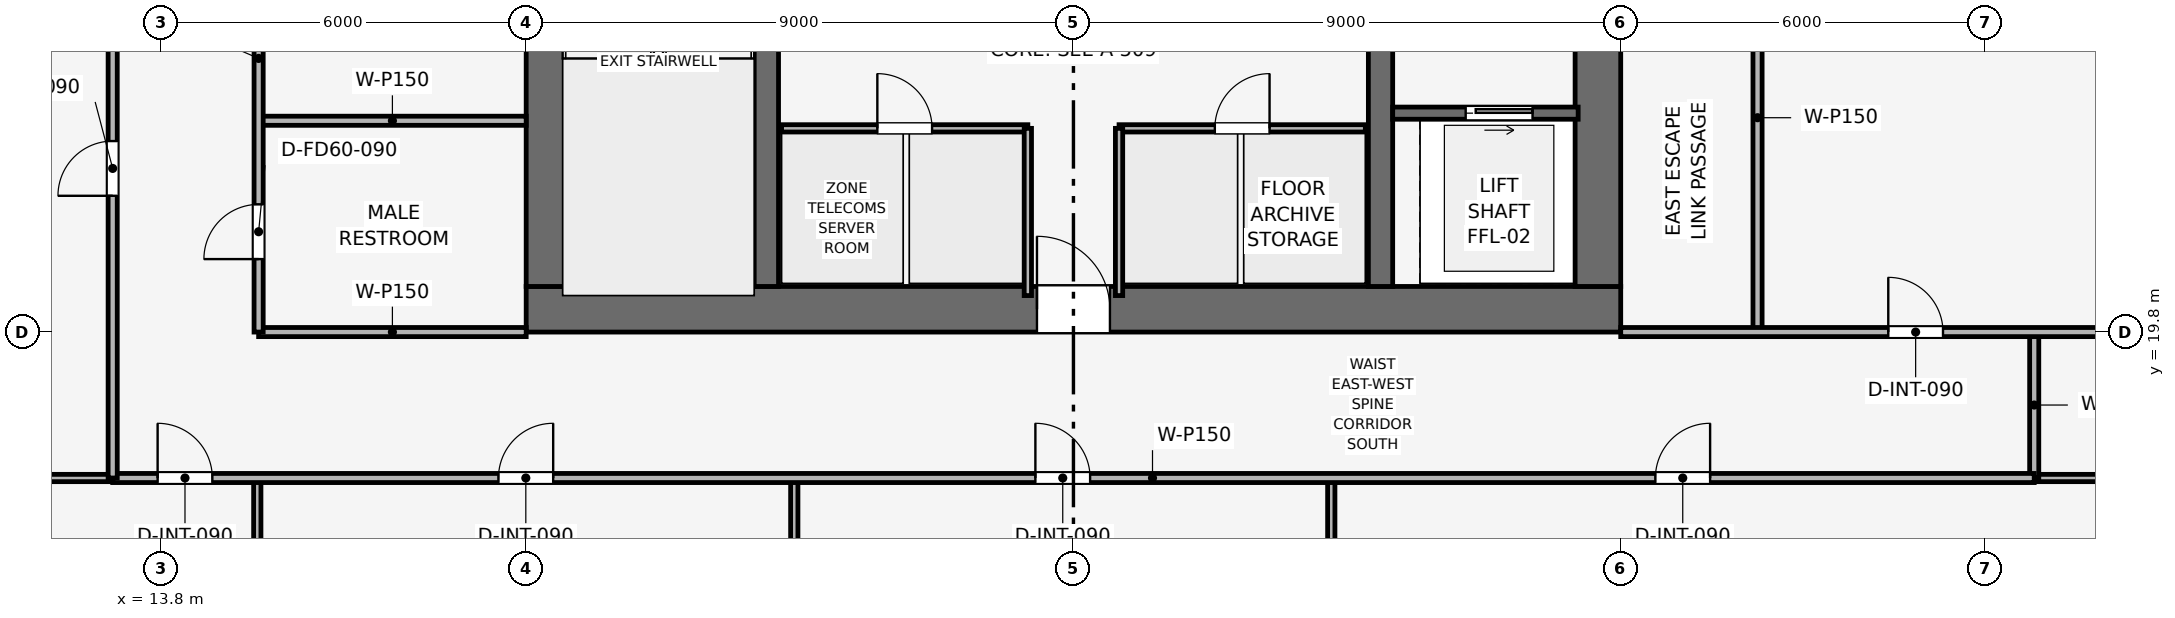
"""IFC4 building model, lengths in metres.
Left out: names, types, materials, properties, quantities, classifications, styles, units other than length and angle.
Written with IfcOpenShell. Run it as: python <this file> out.ifc"""

import sys

from ifc_helpers import new_model, si_unit, direction, frame, frame_2d, origin, place, context, subcontext, project, spatial, rectangle, extrude, element, fill, save


model = new_model("IFC4")
c1 = context("Model", 3, precision=1e-05, world=origin(), true_north=direction((0.0, 1.0)))
c2 = subcontext(c1, "Body", "Model", "MODEL_VIEW")
j1 = project(units=[si_unit("LENGTHUNIT", "METRE"), si_unit("PLANEANGLEUNIT", "RADIAN")], contexts=[c1])
p1 = place(None, origin())
s1 = spatial("IfcSite", under=j1, at=p1, CompositionType="ELEMENT")
p2 = place(p1, origin())
s2 = spatial("IfcBuilding", under=s1, at=p2, CompositionType="ELEMENT")
p3 = place(p2, frame((0.0, 0.0, 203.7)))
s3 = spatial("IfcBuildingStorey", under=s2, at=p3, CompositionType="ELEMENT", Elevation=203.7)
p4 = place(p3, frame((19.8, 20.175, 0.0), z_axis=(0.0, 0.0, 1.0), x_axis=(1.0, 0.0, 0.0)))
e1 = element("IfcWall", 1, at=p4, inside=s3, PredefinedType="SHEAR", context=c2, shape_type="SweptSolid", body=[
    extrude(rectangle(XDim=18.0, YDim=0.75, at=frame_2d((9.0, 0.0))), origin(), (0.0, 0.0, 1.0), 3.75),
])
p5 = place(p4, frame((8.4, 0.0, 0.0)))
e2 = element("IfcOpeningElement", 2, at=p5, cuts=e1, PredefinedType="OPENING", context=c2, shape_type="SweptSolid", body=[
    extrude(rectangle(XDim=1.2, YDim=2.2, at=frame_2d((0.6, 1.1))), frame((0.0, 0.385, 0.0), z_axis=(0.0, -1.0, 0.0), x_axis=(1.0, 0.0, 0.0)), (0.0, 0.0, 1.0), 0.77),
])
p6 = place(p3, frame((20.175, 20.55, 0.0), z_axis=(0.0, 0.0, 1.0), x_axis=(0.0, 1.0, 0.0)))
e3 = element("IfcWall", 3, at=p6, inside=s3, PredefinedType="SHEAR", context=c2, shape_type="SweptSolid", body=[
    extrude(rectangle(XDim=16.5, YDim=0.75, at=frame_2d((8.25, 0.0))), origin(), (0.0, 0.0, 1.0), 3.75),
])
p7 = place(p6, frame((10.25, 0.0, 0.0)))
e4 = element("IfcOpeningElement", 4, at=p7, cuts=e3, PredefinedType="OPENING", context=c2, shape_type="SweptSolid", body=[
    extrude(rectangle(XDim=1.1, YDim=2.15, at=frame_2d((0.55, 1.075))), frame((0.0, 0.385, 0.0), z_axis=(0.0, -1.0, 0.0), x_axis=(1.0, 0.0, 0.0)), (0.0, 0.0, 1.0), 0.77),
])
p8 = place(p3, frame((37.425, 20.55, 0.0), z_axis=(0.0, 0.0, 1.0), x_axis=(0.0, 1.0, 0.0)))
e5 = element("IfcWall", 5, at=p8, inside=s3, PredefinedType="SHEAR", context=c2, shape_type="SweptSolid", body=[
    extrude(rectangle(XDim=16.5, YDim=0.75, at=frame_2d((8.25, 0.0))), origin(), (0.0, 0.0, 1.0), 3.75),
])
p9 = place(p8, frame((4.75, 0.0, 0.0)))
e6 = element("IfcOpeningElement", 6, at=p9, cuts=e5, PredefinedType="OPENING", context=c2, shape_type="SweptSolid", body=[
    extrude(rectangle(XDim=1.1, YDim=2.15, at=frame_2d((0.55, 1.075))), frame((0.0, 0.385, 0.0), z_axis=(0.0, -1.0, 0.0), x_axis=(1.0, 0.0, 0.0)), (0.0, 0.0, 1.0), 0.77),
])
for number, where, z_axis, x_axis in (
    (7, (23.75, 20.55, 0.0), (0.0, 0.0, 1.0), (0.0, 1.0, 0.0)),
    (8, (33.85, 20.55, 0.0), (0.0, 0.0, 1.0), (0.0, 1.0, 0.0)),
):
    element("IfcWall", number, at=place(p3, frame(where, z_axis=z_axis, x_axis=x_axis)), inside=s3, PredefinedType="SHEAR", context=c2, shape_type="SweptSolid", body=[
        extrude(rectangle(XDim=16.5, YDim=0.4, at=frame_2d((8.25, 0.0))), origin(), (0.0, 0.0, 1.0), 3.75),
    ])
p10 = place(p3, frame((34.05, 23.4, 0.0), z_axis=(0.0, 0.0, 1.0), x_axis=(1.0, 0.0, 0.0)))
e9 = element("IfcWall", 9, at=p10, inside=s3, PredefinedType="SHEAR", context=c2, shape_type="SweptSolid", body=[
    extrude(rectangle(XDim=3.05, YDim=0.2, at=frame_2d((1.525, 0.0))), origin(), (0.0, 0.0, 1.0), 3.5),
])
p11 = place(p10, frame((1.2, 0.0, 0.0)))
e10 = element("IfcOpeningElement", 10, at=p11, cuts=e9, PredefinedType="OPENING", context=c2, shape_type="SweptSolid", body=[
    extrude(rectangle(XDim=1.1, YDim=2.15, at=frame_2d((0.55, 1.075))), frame((0.0, 0.11, 0.0), z_axis=(0.0, -1.0, 0.0), x_axis=(1.0, 0.0, 0.0)), (0.0, 0.0, 1.0), 0.22),
])
p12 = place(p3, frame((24.0, 23.15, 0.0), z_axis=(0.0, 0.0, 1.0), x_axis=(1.0, 0.0, 0.0)))
e11 = element("IfcWall", 11, at=p12, inside=s3, PredefinedType="PARTITIONING", context=c2, shape_type="SweptSolid", body=[
    extrude(rectangle(XDim=4.05, YDim=0.12, at=frame_2d((2.025, 0.0))), origin(), (0.0, 0.0, 1.0), 3.5),
])
p13 = place(p12, frame((1.575, 0.0, 0.0)))
e12 = element("IfcOpeningElement", 12, at=p13, cuts=e11, PredefinedType="OPENING", context=c2, shape_type="SweptSolid", body=[
    extrude(rectangle(XDim=0.9, YDim=2.1, at=frame_2d((0.45, 1.05))), frame((0.0, 0.07, 0.0), z_axis=(0.0, -1.0, 0.0), x_axis=(1.0, 0.0, 0.0)), (0.0, 0.0, 1.0), 0.14),
])
p14 = place(p3, frame((28.05, 20.4, 0.0), z_axis=(0.0, 0.0, 1.0), x_axis=(0.0, 1.0, 0.0)))
e13 = element("IfcWall", 13, at=p14, inside=s3, PredefinedType="PARTITIONING", context=c2, shape_type="SweptSolid", body=[
    extrude(rectangle(XDim=2.75, YDim=0.12, at=frame_2d((1.375, 0.0))), origin(), (0.0, 0.0, 1.0), 3.5),
])
p15 = place(p3, frame((29.55, 23.15, 0.0), z_axis=(0.0, 0.0, 1.0), x_axis=(1.0, 0.0, 0.0)))
e14 = element("IfcWall", 14, at=p15, inside=s3, PredefinedType="PARTITIONING", context=c2, shape_type="SweptSolid", body=[
    extrude(rectangle(XDim=4.05, YDim=0.12, at=frame_2d((2.025, 0.0))), origin(), (0.0, 0.0, 1.0), 3.5),
])
p16 = place(p15, frame((1.575, 0.0, 0.0)))
e15 = element("IfcOpeningElement", 15, at=p16, cuts=e14, PredefinedType="OPENING", context=c2, shape_type="SweptSolid", body=[
    extrude(rectangle(XDim=0.9, YDim=2.1, at=frame_2d((0.45, 1.05))), frame((0.0, 0.07, 0.0), z_axis=(0.0, -1.0, 0.0), x_axis=(1.0, 0.0, 0.0)), (0.0, 0.0, 1.0), 0.14),
])
p17 = place(p3, frame((29.55, 20.4, 0.0), z_axis=(0.0, 0.0, 1.0), x_axis=(0.0, 1.0, 0.0)))
e16 = element("IfcWall", 16, at=p17, inside=s3, PredefinedType="PARTITIONING", context=c2, shape_type="SweptSolid", body=[
    extrude(rectangle(XDim=2.75, YDim=0.12, at=frame_2d((1.375, 0.0))), origin(), (0.0, 0.0, 1.0), 3.5),
])
p18 = place(p3, frame((15.4, 19.8, 0.0), z_axis=(0.0, 0.0, 1.0), x_axis=(1.0, 0.0, 0.0)))
e17 = element("IfcWall", 17, at=p18, inside=s3, PredefinedType="PARTITIONING", context=c2, shape_type="SweptSolid", body=[
    extrude(rectangle(XDim=4.4, YDim=0.15, at=frame_2d((2.2, 0.0))), origin(), (0.0, 0.0, 1.0), 3.035),
])
p19 = place(p3, frame((15.4, 23.275, 0.0), z_axis=(0.0, 0.0, 1.0), x_axis=(1.0, 0.0, 0.0)))
e18 = element("IfcWall", 18, at=p19, inside=s3, PredefinedType="PARTITIONING", context=c2, shape_type="SweptSolid", body=[
    extrude(rectangle(XDim=4.4, YDim=0.15, at=frame_2d((2.2, 0.0))), origin(), (0.0, 0.0, 1.0), 3.5),
])
p20 = place(p3, frame((15.4, 19.8, 0.0), z_axis=(0.0, 0.0, 1.0), x_axis=(0.0, 1.0, 0.0)))
e19 = element("IfcWall", 19, at=p20, inside=s3, PredefinedType="PARTITIONING", context=c2, shape_type="SweptSolid", body=[
    extrude(rectangle(XDim=10.35, YDim=0.15, at=frame_2d((5.175, 0.0))), origin(), (0.0, 0.0, 1.0), 3.035),
])
p21 = place(p20, frame((1.2, 0.0, 0.0)))
e20 = element("IfcOpeningElement", 20, at=p21, cuts=e19, PredefinedType="OPENING", context=c2, shape_type="SweptSolid", body=[
    extrude(rectangle(XDim=0.9, YDim=2.1, at=frame_2d((0.45, 1.05))), frame((0.0, 0.085, 0.0), z_axis=(0.0, -1.0, 0.0), x_axis=(1.0, 0.0, 0.0)), (0.0, 0.0, 1.0), 0.17),
])
p22 = place(p20, frame((4.7, 0.0, 0.0)))
e21 = element("IfcOpeningElement", 21, at=p22, cuts=e19, PredefinedType="OPENING", context=c2, shape_type="SweptSolid", body=[
    extrude(rectangle(XDim=0.9, YDim=2.1, at=frame_2d((0.45, 1.05))), frame((0.0, 0.085, 0.0), z_axis=(0.0, -1.0, 0.0), x_axis=(1.0, 0.0, 0.0)), (0.0, 0.0, 1.0), 0.17),
])
p23 = place(p20, frame((8.1, 0.0, 0.0)))
e22 = element("IfcOpeningElement", 22, at=p23, cuts=e19, PredefinedType="OPENING", context=c2, shape_type="SweptSolid", body=[
    extrude(rectangle(XDim=0.95, YDim=2.1, at=frame_2d((0.475, 1.05))), frame((0.0, 0.085, 0.0), z_axis=(0.0, -1.0, 0.0), x_axis=(1.0, 0.0, 0.0)), (0.0, 0.0, 1.0), 0.17),
])
p24 = place(p3, frame((40.05, 19.8, 0.0), z_axis=(0.0, 0.0, 1.0), x_axis=(0.0, 1.0, 0.0)))
e23 = element("IfcWall", 23, at=p24, inside=s3, PredefinedType="PARTITIONING", context=c2, shape_type="SweptSolid", body=[
    extrude(rectangle(XDim=7.05, YDim=0.15, at=frame_2d((3.525, 0.0))), origin(), (0.0, 0.0, 1.0), 3.035),
])
for number, where, z_axis, x_axis in (
    (24, (15.378, 1.93, 0.0), (0.0, 0.0, 1.0), (0.0, 1.0, 0.0)),
    (25, (24.209, 1.93, 0.0), (0.0, 0.0, 1.0), (0.0, 1.0, 0.0)),
    (26, (33.04, 1.93, 0.0), (0.0, 0.0, 1.0), (0.0, 1.0, 0.0)),
):
    element("IfcWall", number, at=place(p3, frame(where, z_axis=z_axis, x_axis=x_axis)), inside=s3, PredefinedType="PARTITIONING", context=c2, shape_type="SweptSolid", body=[
        extrude(rectangle(XDim=15.47, YDim=0.12, at=frame_2d((7.735, 0.0))), origin(), (0.0, 0.0, 1.0), 2.885),
    ])
p25 = place(p3, frame((1.93, 17.4, 0.0), z_axis=(0.0, 0.0, 1.0), x_axis=(1.0, 0.0, 0.0)))
e27 = element("IfcWall", 27, at=p25, inside=s3, PredefinedType="PARTITIONING", context=c2, shape_type="SweptSolid", body=[
    extrude(rectangle(XDim=11.07, YDim=0.12, at=frame_2d((5.535, 0.0))), origin(), (0.0, 0.0, 1.0), 2.885),
])
p26 = place(p3, frame((44.6, 17.4, 0.0), z_axis=(0.0, 0.0, 1.0), x_axis=(1.0, 0.0, 0.0)))
e28 = element("IfcWall", 28, at=p26, inside=s3, PredefinedType="PARTITIONING", context=c2, shape_type="SweptSolid", body=[
    extrude(rectangle(XDim=11.07, YDim=0.12, at=frame_2d((5.535, 0.0))), origin(), (0.0, 0.0, 1.0), 2.885),
])
p27 = place(p3, frame((44.6, 17.4, 0.0), z_axis=(0.0, 0.0, 1.0), x_axis=(0.0, 1.0, 0.0)))
e29 = element("IfcWall", 29, at=p27, inside=s3, PredefinedType="PARTITIONING", context=c2, shape_type="SweptSolid", body=[
    extrude(rectangle(XDim=2.4, YDim=0.15, at=frame_2d((1.2, 0.0))), origin(), (0.0, 0.0, 1.0), 3.5),
])
p28 = place(p3, frame((37.8, 19.8, 0.0), z_axis=(0.0, 0.0, 1.0), x_axis=(1.0, 0.0, 0.0)))
e30 = element("IfcWall", 30, at=p28, inside=s3, PredefinedType="PARTITIONING", context=c2, shape_type="SweptSolid", body=[
    extrude(rectangle(XDim=17.87, YDim=0.15, at=frame_2d((8.935, 0.0))), origin(), (0.0, 0.0, 1.0), 2.885),
])
p29 = place(p28, frame((4.4, 0.0, 0.0)))
e31 = element("IfcOpeningElement", 31, at=p29, cuts=e30, PredefinedType="OPENING", context=c2, shape_type="SweptSolid", body=[
    extrude(rectangle(XDim=0.9, YDim=2.1, at=frame_2d((0.45, 1.05))), frame((0.0, 0.085, 0.0), z_axis=(0.0, -1.0, 0.0), x_axis=(1.0, 0.0, 0.0)), (0.0, 0.0, 1.0), 0.17),
])
p30 = place(p3, frame((13.0, 17.4, 0.0), z_axis=(0.0, 0.0, 1.0), x_axis=(1.0, 0.0, 0.0)))
e32 = element("IfcWall", 32, at=p30, inside=s3, PredefinedType="PARTITIONING", context=c2, shape_type="SweptSolid", body=[
    extrude(rectangle(XDim=31.6, YDim=0.15, at=frame_2d((15.8, 0.0))), origin(), (0.0, 0.0, 1.0), 3.035),
])
p31 = place(p30, frame((0.739, 0.0, 0.0)))
e33 = element("IfcOpeningElement", 33, at=p31, cuts=e32, PredefinedType="OPENING", context=c2, shape_type="SweptSolid", body=[
    extrude(rectangle(XDim=0.9, YDim=2.1, at=frame_2d((0.45, 1.05))), frame((0.0, 0.085, 0.0), z_axis=(0.0, -1.0, 0.0), x_axis=(1.0, 0.0, 0.0)), (0.0, 0.0, 1.0), 0.17),
])
p32 = place(p30, frame((6.344, 0.0, 0.0)))
e34 = element("IfcOpeningElement", 34, at=p32, cuts=e32, PredefinedType="OPENING", context=c2, shape_type="SweptSolid", body=[
    extrude(rectangle(XDim=0.9, YDim=2.1, at=frame_2d((0.45, 1.05))), frame((0.0, 0.085, 0.0), z_axis=(0.0, -1.0, 0.0), x_axis=(1.0, 0.0, 0.0)), (0.0, 0.0, 1.0), 0.17),
])
p33 = place(p30, frame((15.174, 0.0, 0.0)))
e35 = element("IfcOpeningElement", 35, at=p33, cuts=e32, PredefinedType="OPENING", context=c2, shape_type="SweptSolid", body=[
    extrude(rectangle(XDim=0.9, YDim=2.1, at=frame_2d((0.45, 1.05))), frame((0.0, 0.085, 0.0), z_axis=(0.0, -1.0, 0.0), x_axis=(1.0, 0.0, 0.0)), (0.0, 0.0, 1.0), 0.17),
])
p34 = place(p30, frame((25.37, 0.0, 0.0)))
e36 = element("IfcOpeningElement", 36, at=p34, cuts=e32, PredefinedType="OPENING", context=c2, shape_type="SweptSolid", body=[
    extrude(rectangle(XDim=0.9, YDim=2.1, at=frame_2d((0.45, 1.05))), frame((0.0, 0.085, 0.0), z_axis=(0.0, -1.0, 0.0), x_axis=(1.0, 0.0, 0.0)), (0.0, 0.0, 1.0), 0.17),
])
p35 = place(p3, frame((13.0, 17.4, 0.0), z_axis=(0.0, 0.0, 1.0), x_axis=(0.0, 1.0, 0.0)))
e37 = element("IfcWall", 37, at=p35, inside=s3, PredefinedType="PARTITIONING", context=c2, shape_type="SweptSolid", body=[
    extrude(rectangle(XDim=22.8, YDim=0.15, at=frame_2d((11.4, 0.0))), origin(), (0.0, 0.0, 1.0), 3.035),
])
p36 = place(p35, frame((4.641, 0.0, 0.0)))
e38 = element("IfcOpeningElement", 38, at=p36, cuts=e37, PredefinedType="OPENING", context=c2, shape_type="SweptSolid", body=[
    extrude(rectangle(XDim=0.9, YDim=2.1, at=frame_2d((0.45, 1.05))), frame((0.0, 0.085, 0.0), z_axis=(0.0, -1.0, 0.0), x_axis=(1.0, 0.0, 0.0)), (0.0, 0.0, 1.0), 0.17),
])
p37 = place(p35, frame((13.641, 0.0, 0.0)))
e39 = element("IfcOpeningElement", 39, at=p37, cuts=e37, PredefinedType="OPENING", context=c2, shape_type="SweptSolid", body=[
    extrude(rectangle(XDim=0.9, YDim=2.1, at=frame_2d((0.45, 1.05))), frame((0.0, 0.085, 0.0), z_axis=(0.0, -1.0, 0.0), x_axis=(1.0, 0.0, 0.0)), (0.0, 0.0, 1.0), 0.17),
])
p38 = place(p11, origin())
e40 = element("IfcDoor", 40, at=p38, inside=s3, OperationType="SLIDING_TO_RIGHT", PredefinedType="DOOR", context=c2, shape_type="SweptSolid", body=[
    extrude(rectangle(XDim=1.1, YDim=2.15, at=frame_2d((0.55, 1.075))), frame((0.0, 0.025, 0.0), z_axis=(0.0, -1.0, 0.0), x_axis=(1.0, 0.0, 0.0)), (0.0, 0.0, 1.0), 0.05),
])
fill(e10, e40)
p39 = place(p13, origin())
e41 = element("IfcDoor", 41, at=p39, inside=s3, OperationType="SINGLE_SWING_LEFT", PredefinedType="DOOR", context=c2, shape_type="SweptSolid", body=[
    extrude(rectangle(XDim=0.9, YDim=2.1, at=frame_2d((0.45, 1.05))), frame((0.0, 0.025, 0.0), z_axis=(0.0, -1.0, 0.0), x_axis=(1.0, 0.0, 0.0)), (0.0, 0.0, 1.0), 0.05),
])
fill(e12, e41)
p40 = place(p16, origin())
e42 = element("IfcDoor", 42, at=p40, inside=s3, OperationType="SINGLE_SWING_RIGHT", PredefinedType="DOOR", context=c2, shape_type="SweptSolid", body=[
    extrude(rectangle(XDim=0.9, YDim=2.1, at=frame_2d((0.45, 1.05))), frame((0.0, 0.025, 0.0), z_axis=(0.0, -1.0, 0.0), x_axis=(1.0, 0.0, 0.0)), (0.0, 0.0, 1.0), 0.05),
])
fill(e15, e42)
p41 = place(p21, origin())
e43 = element("IfcDoor", 43, at=p41, inside=s3, OperationType="SINGLE_SWING_LEFT", PredefinedType="DOOR", context=c2, shape_type="SweptSolid", body=[
    extrude(rectangle(XDim=0.9, YDim=2.1, at=frame_2d((0.45, 1.05))), frame((0.0, 0.025, 0.0), z_axis=(0.0, -1.0, 0.0), x_axis=(1.0, 0.0, 0.0)), (0.0, 0.0, 1.0), 0.05),
])
fill(e20, e43)
p42 = place(p29, origin())
e44 = element("IfcDoor", 44, at=p42, inside=s3, OperationType="SINGLE_SWING_LEFT", PredefinedType="DOOR", context=c2, shape_type="SweptSolid", body=[
    extrude(rectangle(XDim=0.9, YDim=2.1, at=frame_2d((0.45, 1.05))), frame((0.0, 0.025, 0.0), z_axis=(0.0, -1.0, 0.0), x_axis=(1.0, 0.0, 0.0)), (0.0, 0.0, 1.0), 0.05),
])
fill(e31, e44)
p43 = place(p31, origin())
e45 = element("IfcDoor", 45, at=p43, inside=s3, OperationType="SINGLE_SWING_LEFT", PredefinedType="DOOR", context=c2, shape_type="SweptSolid", body=[
    extrude(rectangle(XDim=0.9, YDim=2.1, at=frame_2d((0.45, 1.05))), frame((0.0, 0.025, 0.0), z_axis=(0.0, -1.0, 0.0), x_axis=(1.0, 0.0, 0.0)), (0.0, 0.0, 1.0), 0.05),
])
fill(e33, e45)
p44 = place(p32, origin())
e46 = element("IfcDoor", 46, at=p44, inside=s3, OperationType="SINGLE_SWING_RIGHT", PredefinedType="DOOR", context=c2, shape_type="SweptSolid", body=[
    extrude(rectangle(XDim=0.9, YDim=2.1, at=frame_2d((0.45, 1.05))), frame((0.0, 0.025, 0.0), z_axis=(0.0, -1.0, 0.0), x_axis=(1.0, 0.0, 0.0)), (0.0, 0.0, 1.0), 0.05),
])
fill(e34, e46)
p45 = place(p33, origin())
e47 = element("IfcDoor", 47, at=p45, inside=s3, OperationType="SINGLE_SWING_LEFT", PredefinedType="DOOR", context=c2, shape_type="SweptSolid", body=[
    extrude(rectangle(XDim=0.9, YDim=2.1, at=frame_2d((0.45, 1.05))), frame((0.0, 0.025, 0.0), z_axis=(0.0, -1.0, 0.0), x_axis=(1.0, 0.0, 0.0)), (0.0, 0.0, 1.0), 0.05),
])
fill(e35, e47)
p46 = place(p34, origin())
e48 = element("IfcDoor", 48, at=p46, inside=s3, OperationType="SINGLE_SWING_RIGHT", PredefinedType="DOOR", context=c2, shape_type="SweptSolid", body=[
    extrude(rectangle(XDim=0.9, YDim=2.1, at=frame_2d((0.45, 1.05))), frame((0.0, 0.025, 0.0), z_axis=(0.0, -1.0, 0.0), x_axis=(1.0, 0.0, 0.0)), (0.0, 0.0, 1.0), 0.05),
])
fill(e36, e48)
p47 = place(p36, origin())
e49 = element("IfcDoor", 49, at=p47, inside=s3, OperationType="SINGLE_SWING_LEFT", PredefinedType="DOOR", context=c2, shape_type="SweptSolid", body=[
    extrude(rectangle(XDim=0.9, YDim=2.1, at=frame_2d((0.45, 1.05))), frame((0.0, 0.025, 0.0), z_axis=(0.0, -1.0, 0.0), x_axis=(1.0, 0.0, 0.0)), (0.0, 0.0, 1.0), 0.05),
])
fill(e38, e49)
p48 = place(p5, origin())
e50 = element("IfcDoor", 50, at=p48, inside=s3, OperationType="SINGLE_SWING_LEFT", PredefinedType="DOOR", context=c2, shape_type="SweptSolid", body=[
    extrude(rectangle(XDim=1.2, YDim=2.2, at=frame_2d((0.6, 1.1))), frame((0.0, 0.025, 0.0), z_axis=(0.0, -1.0, 0.0), x_axis=(1.0, 0.0, 0.0)), (0.0, 0.0, 1.0), 0.05),
])
fill(e2, e50)
save(model, sys.argv[1])
